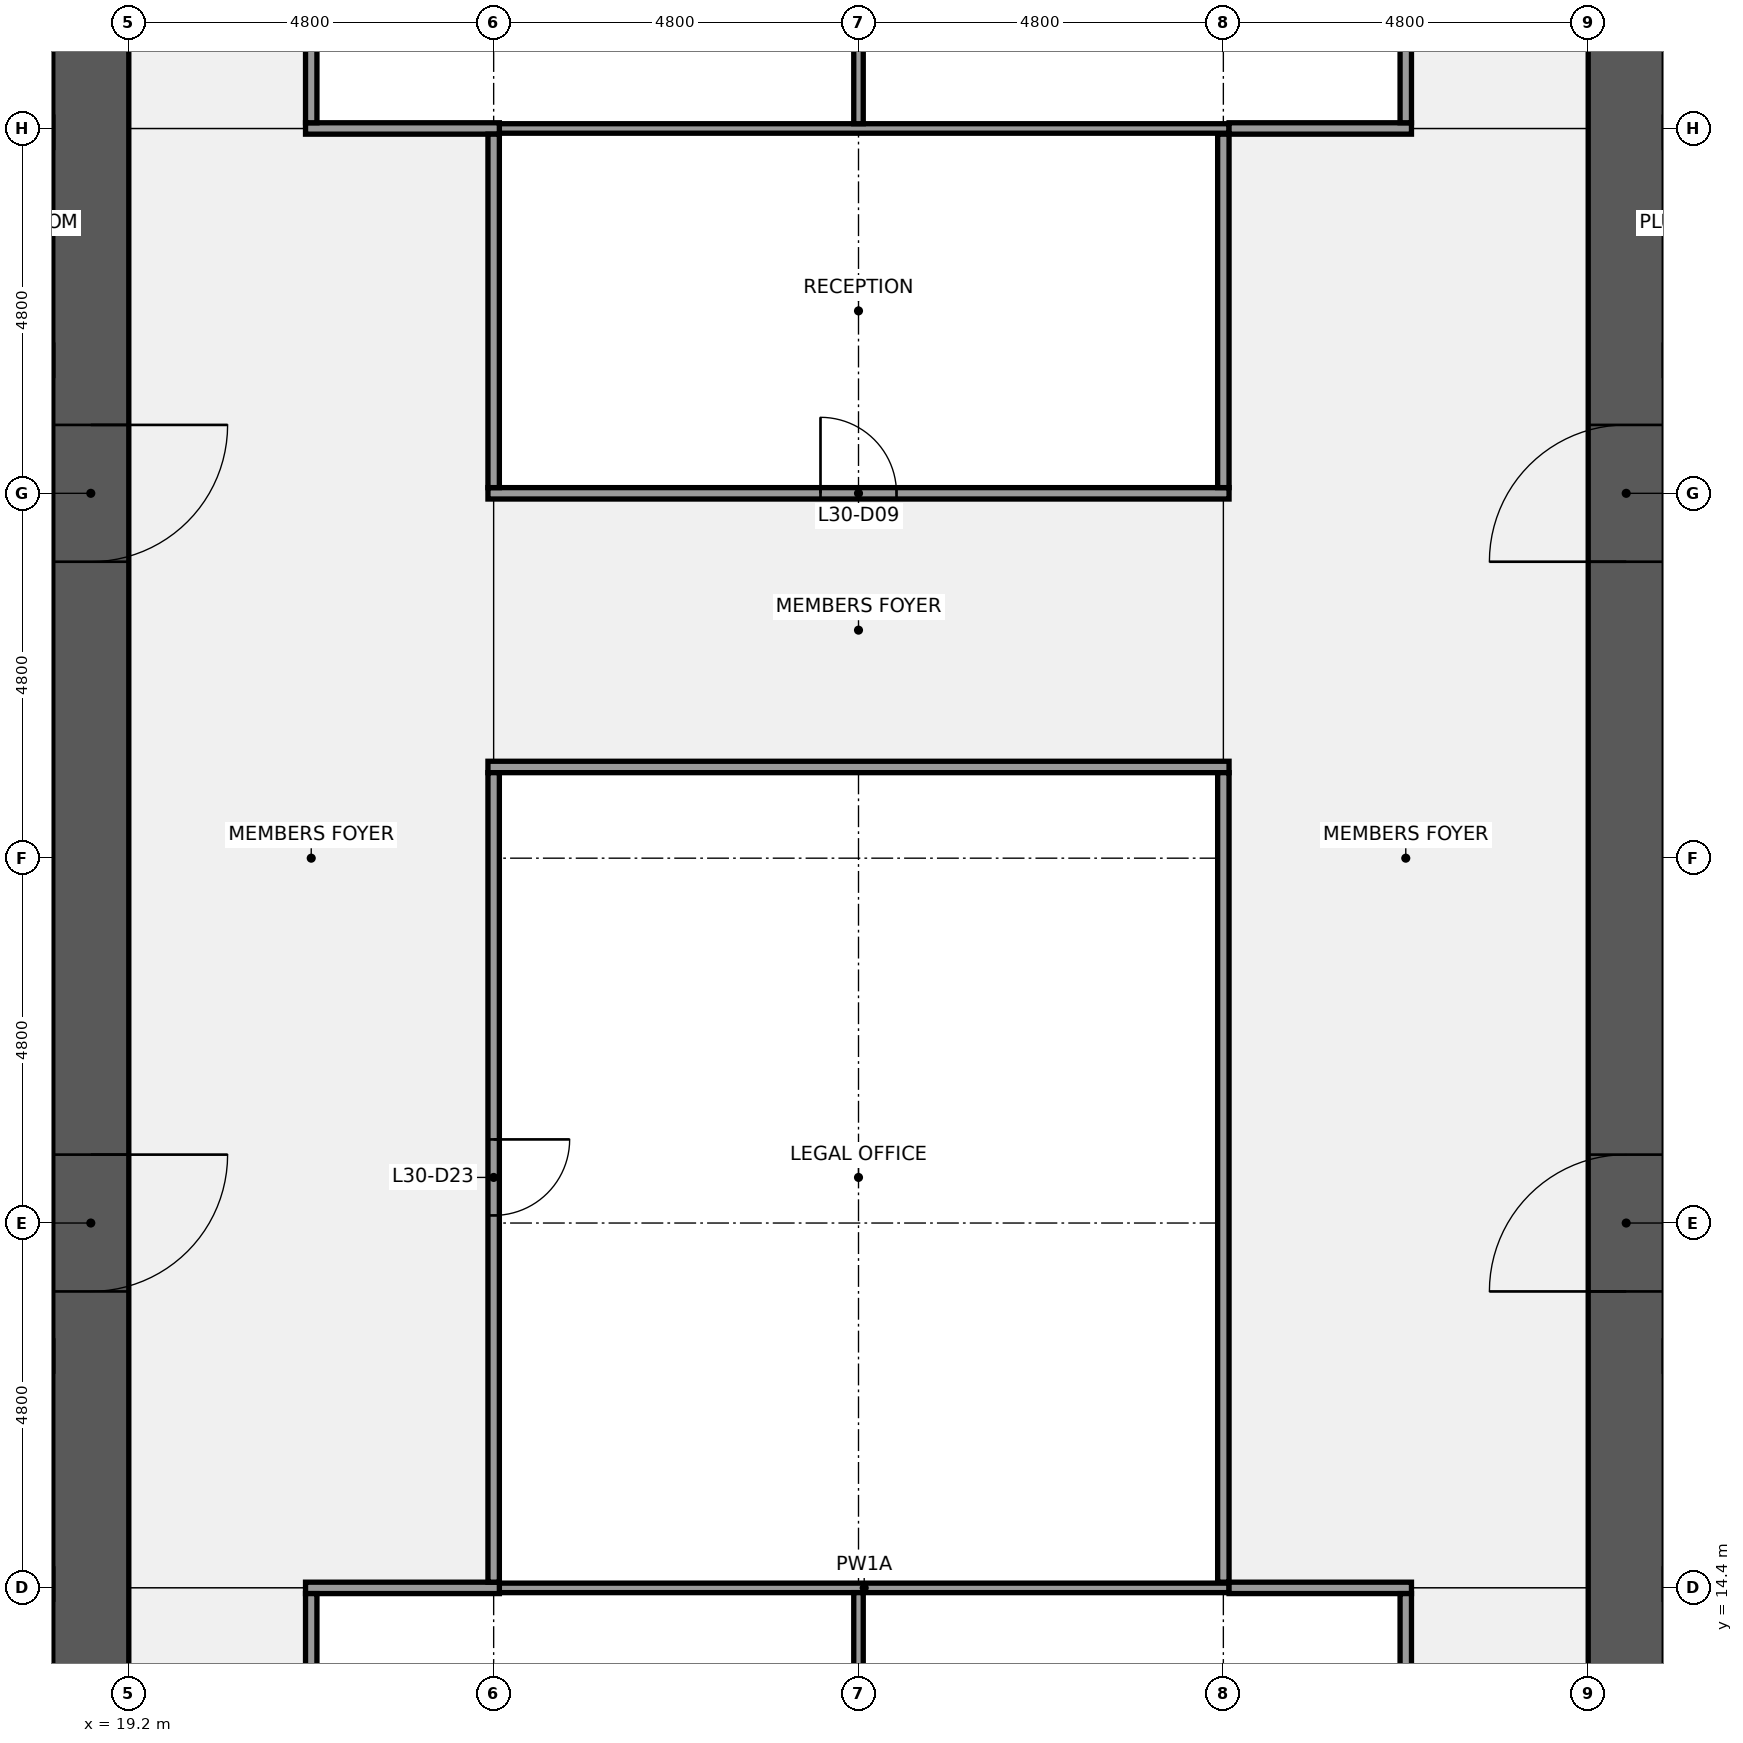
"""IFC4 building model, lengths in metres.
Left out: names, types, materials, properties, quantities, classifications, styles, units other than length and angle.
Written with IfcOpenShell. Run it as: python <this file> out.ifc"""

import sys

from ifc_helpers import new_model, si_unit, direction, frame, frame_2d, origin, place, context, subcontext, project, spatial, rectangle, extrude, element, fill, save


model = new_model("IFC4")
c1 = context("Model", 3, precision=1e-05, world=origin(), true_north=direction((0.0, 1.0)))
c2 = subcontext(c1, "Body", "Model", "MODEL_VIEW")
j1 = project(units=[si_unit("LENGTHUNIT", "METRE"), si_unit("PLANEANGLEUNIT", "RADIAN")], contexts=[c1])
p1 = place(None, origin())
s1 = spatial("IfcSite", under=j1, at=p1, CompositionType="ELEMENT")
p2 = place(p1, origin())
s2 = spatial("IfcBuilding", under=s1, at=p2, CompositionType="ELEMENT")
p3 = place(p2, frame((0.0, 0.0, 140.1)))
s3 = spatial("IfcBuildingStorey", under=s2, at=p3, CompositionType="ELEMENT", Elevation=140.1)
p4 = place(p3, frame((18.7, 38.4, 0.0), z_axis=(0.0, 0.0, 1.0), x_axis=(0.0, -1.0, 0.0)))
e1 = element("IfcWall", 1, at=p4, inside=s3, PredefinedType="SHEAR", context=c2, shape_type="SweptSolid", body=[
    extrude(rectangle(XDim=28.8, YDim=1.0, at=frame_2d((14.4, 0.0))), origin(), (0.0, 0.0, 1.0), 3.84),
])
p5 = place(p4, frame((18.3, 0.0, 0.0)))
e2 = element("IfcOpeningElement", 2, at=p5, cuts=e1, PredefinedType="OPENING", context=c2, shape_type="SweptSolid", body=[
    extrude(rectangle(XDim=1.8, YDim=2.1, at=frame_2d((0.9, 1.05))), frame((0.0, 0.51, 0.0), z_axis=(0.0, -1.0, 0.0), x_axis=(1.0, 0.0, 0.0)), (0.0, 0.0, 1.0), 1.02),
])
p6 = place(p4, frame((8.7, 0.0, 0.0)))
e3 = element("IfcOpeningElement", 3, at=p6, cuts=e1, PredefinedType="OPENING", context=c2, shape_type="SweptSolid", body=[
    extrude(rectangle(XDim=1.8, YDim=2.1, at=frame_2d((0.9, 1.05))), frame((0.0, 0.51, 0.0), z_axis=(0.0, -1.0, 0.0), x_axis=(1.0, 0.0, 0.0)), (0.0, 0.0, 1.0), 1.02),
])
p7 = place(p3, frame((1.0, 14.45, 0.0), z_axis=(0.0, 0.0, 1.0), x_axis=(1.0, 0.0, 0.0)))
e4 = element("IfcWall", 4, at=p7, inside=s3, PredefinedType="SHEAR", context=c2, shape_type="SweptSolid", body=[
    extrude(rectangle(XDim=17.2, YDim=0.4, at=frame_2d((8.6, 0.0))), origin(), (0.0, 0.0, 1.0), 3.84),
])
p8 = place(p3, frame((1.0, 17.45, 0.0), z_axis=(0.0, 0.0, 1.0), x_axis=(1.0, 0.0, 0.0)))
e5 = element("IfcWall", 5, at=p8, inside=s3, PredefinedType="SHEAR", context=c2, shape_type="SweptSolid", body=[
    extrude(rectangle(XDim=17.2, YDim=0.4, at=frame_2d((8.6, 0.0))), origin(), (0.0, 0.0, 1.0), 3.84),
])
p9 = place(p8, frame((0.762, 0.0, 0.0)))
e6 = element("IfcOpeningElement", 6, at=p9, cuts=e5, PredefinedType="OPENING", context=c2, shape_type="SweptSolid", body=[
    extrude(rectangle(XDim=1.0, YDim=2.1, at=frame_2d((0.5, 1.05))), frame((0.0, 0.21, 0.0), z_axis=(0.0, -1.0, 0.0), x_axis=(1.0, 0.0, 0.0)), (0.0, 0.0, 1.0), 0.42),
])
p10 = place(p8, frame((4.2, 0.0, 0.0)))
e7 = element("IfcOpeningElement", 7, at=p10, cuts=e5, PredefinedType="OPENING", context=c2, shape_type="SweptSolid", body=[
    extrude(rectangle(XDim=1.0, YDim=2.1, at=frame_2d((0.5, 1.05))), frame((0.0, 0.21, 0.0), z_axis=(0.0, -1.0, 0.0), x_axis=(1.0, 0.0, 0.0)), (0.0, 0.0, 1.0), 0.42),
])
p11 = place(p8, frame((8.4, 0.0, 0.0)))
e8 = element("IfcOpeningElement", 8, at=p11, cuts=e5, PredefinedType="OPENING", context=c2, shape_type="SweptSolid", body=[
    extrude(rectangle(XDim=1.0, YDim=2.1, at=frame_2d((0.5, 1.05))), frame((0.0, 0.21, 0.0), z_axis=(0.0, -1.0, 0.0), x_axis=(1.0, 0.0, 0.0)), (0.0, 0.0, 1.0), 0.42),
])
p12 = place(p8, frame((13.637, 0.0, 0.0)))
e9 = element("IfcOpeningElement", 9, at=p12, cuts=e5, PredefinedType="OPENING", context=c2, shape_type="SweptSolid", body=[
    extrude(rectangle(XDim=1.0, YDim=2.1, at=frame_2d((0.5, 1.05))), frame((0.0, 0.21, 0.0), z_axis=(0.0, -1.0, 0.0), x_axis=(1.0, 0.0, 0.0)), (0.0, 0.0, 1.0), 0.42),
])
p13 = place(p3, frame((1.0, 30.55, 0.0), z_axis=(0.0, 0.0, 1.0), x_axis=(1.0, 0.0, 0.0)))
e10 = element("IfcWall", 10, at=p13, inside=s3, PredefinedType="SHEAR", context=c2, shape_type="SweptSolid", body=[
    extrude(rectangle(XDim=17.2, YDim=0.4, at=frame_2d((8.6, 0.0))), origin(), (0.0, 0.0, 1.0), 3.84),
])
p14 = place(p13, frame((1.962, 0.0, 0.0)))
e11 = element("IfcOpeningElement", 11, at=p14, cuts=e10, PredefinedType="OPENING", context=c2, shape_type="SweptSolid", body=[
    extrude(rectangle(XDim=1.0, YDim=2.1, at=frame_2d((0.5, 1.05))), frame((0.0, 0.21, 0.0), z_axis=(0.0, -1.0, 0.0), x_axis=(1.0, 0.0, 0.0)), (0.0, 0.0, 1.0), 0.42),
])
p15 = place(p13, frame((6.6, 0.0, 0.0)))
e12 = element("IfcOpeningElement", 12, at=p15, cuts=e10, PredefinedType="OPENING", context=c2, shape_type="SweptSolid", body=[
    extrude(rectangle(XDim=1.0, YDim=2.1, at=frame_2d((0.5, 1.05))), frame((0.0, 0.21, 0.0), z_axis=(0.0, -1.0, 0.0), x_axis=(1.0, 0.0, 0.0)), (0.0, 0.0, 1.0), 0.42),
])
p16 = place(p13, frame((11.1, 0.0, 0.0)))
e13 = element("IfcOpeningElement", 13, at=p16, cuts=e10, PredefinedType="OPENING", context=c2, shape_type="SweptSolid", body=[
    extrude(rectangle(XDim=1.0, YDim=2.1, at=frame_2d((0.5, 1.05))), frame((0.0, 0.21, 0.0), z_axis=(0.0, -1.0, 0.0), x_axis=(1.0, 0.0, 0.0)), (0.0, 0.0, 1.0), 0.42),
])
p17 = place(p13, frame((15.137, 0.0, 0.0)))
e14 = element("IfcOpeningElement", 14, at=p17, cuts=e10, PredefinedType="OPENING", context=c2, shape_type="SweptSolid", body=[
    extrude(rectangle(XDim=1.0, YDim=2.1, at=frame_2d((0.5, 1.05))), frame((0.0, 0.21, 0.0), z_axis=(0.0, -1.0, 0.0), x_axis=(1.0, 0.0, 0.0)), (0.0, 0.0, 1.0), 0.42),
])
p18 = place(p3, frame((1.0, 33.55, 0.0), z_axis=(0.0, 0.0, 1.0), x_axis=(1.0, 0.0, 0.0)))
e15 = element("IfcWall", 15, at=p18, inside=s3, PredefinedType="SHEAR", context=c2, shape_type="SweptSolid", body=[
    extrude(rectangle(XDim=17.2, YDim=0.4, at=frame_2d((8.6, 0.0))), origin(), (0.0, 0.0, 1.0), 3.84),
])
p19 = place(p3, frame((38.9, 9.6, 0.0), z_axis=(0.0, 0.0, 1.0), x_axis=(0.0, 1.0, 0.0)))
e16 = element("IfcWall", 16, at=p19, inside=s3, PredefinedType="SHEAR", context=c2, shape_type="SweptSolid", body=[
    extrude(rectangle(XDim=28.8, YDim=1.0, at=frame_2d((14.4, 0.0))), origin(), (0.0, 0.0, 1.0), 3.84),
])
p20 = place(p19, frame((8.7, 0.0, 0.0)))
e17 = element("IfcOpeningElement", 17, at=p20, cuts=e16, PredefinedType="OPENING", context=c2, shape_type="SweptSolid", body=[
    extrude(rectangle(XDim=1.8, YDim=2.1, at=frame_2d((0.9, 1.05))), frame((0.0, 0.51, 0.0), z_axis=(0.0, -1.0, 0.0), x_axis=(1.0, 0.0, 0.0)), (0.0, 0.0, 1.0), 1.02),
])
p21 = place(p19, frame((18.3, 0.0, 0.0)))
e18 = element("IfcOpeningElement", 18, at=p21, cuts=e16, PredefinedType="OPENING", context=c2, shape_type="SweptSolid", body=[
    extrude(rectangle(XDim=1.8, YDim=2.1, at=frame_2d((0.9, 1.05))), frame((0.0, 0.51, 0.0), z_axis=(0.0, -1.0, 0.0), x_axis=(1.0, 0.0, 0.0)), (0.0, 0.0, 1.0), 1.02),
])
p22 = place(p3, frame((24.075, 14.4, 0.0), z_axis=(0.0, 0.0, 1.0), x_axis=(1.0, 0.0, 0.0)))
e19 = element("IfcWall", 19, at=p22, inside=s3, PredefinedType="PARTITIONING", context=c2, shape_type="SweptSolid", body=[
    extrude(rectangle(XDim=9.6, YDim=0.125, at=frame_2d((4.8, 0.0))), origin(), (0.0, 0.0, 1.0), 2.936),
])
p23 = place(p3, frame((21.525, 14.4, 0.0), z_axis=(0.0, 0.0, 1.0), x_axis=(1.0, 0.0, 0.0)))
e20 = element("IfcWall", 20, at=p23, inside=s3, PredefinedType="PARTITIONING", context=c2, shape_type="SweptSolid", body=[
    extrude(rectangle(XDim=2.55, YDim=0.15, at=frame_2d((1.275, 0.0))), origin(), (0.0, 0.0, 1.0), 2.936),
])
p24 = place(p3, frame((33.675, 14.4, 0.0), z_axis=(0.0, 0.0, 1.0), x_axis=(1.0, 0.0, 0.0)))
e21 = element("IfcWall", 21, at=p24, inside=s3, PredefinedType="PARTITIONING", context=c2, shape_type="SweptSolid", body=[
    extrude(rectangle(XDim=2.4, YDim=0.15, at=frame_2d((1.2, 0.0))), origin(), (0.0, 0.0, 1.0), 2.936),
])
p25 = place(p3, frame((23.925, 25.2, 0.0), z_axis=(0.0, 0.0, 1.0), x_axis=(1.0, 0.0, 0.0)))
e22 = element("IfcWall", 22, at=p25, inside=s3, PredefinedType="PARTITIONING", context=c2, shape_type="SweptSolid", body=[
    extrude(rectangle(XDim=9.75, YDim=0.15, at=frame_2d((4.875, 0.0))), origin(), (0.0, 0.0, 1.0), 2.936),
])
p26 = place(p3, frame((23.925, 28.8, 0.0), z_axis=(0.0, 0.0, 1.0), x_axis=(1.0, 0.0, 0.0)))
e23 = element("IfcWall", 23, at=p26, inside=s3, PredefinedType="PARTITIONING", context=c2, shape_type="SweptSolid", body=[
    extrude(rectangle(XDim=9.75, YDim=0.15, at=frame_2d((4.875, 0.0))), origin(), (0.0, 0.0, 1.0), 2.936),
])
p27 = place(p26, frame((4.375, 0.0, 0.0)))
e24 = element("IfcOpeningElement", 24, at=p27, cuts=e23, PredefinedType="OPENING", context=c2, shape_type="SweptSolid", body=[
    extrude(rectangle(XDim=1.0, YDim=2.1, at=frame_2d((0.5, 1.05))), frame((0.0, 0.085, 0.0), z_axis=(0.0, -1.0, 0.0), x_axis=(1.0, 0.0, 0.0)), (0.0, 0.0, 1.0), 0.17),
])
p28 = place(p3, frame((24.075, 33.6, 0.0), z_axis=(0.0, 0.0, 1.0), x_axis=(1.0, 0.0, 0.0)))
e25 = element("IfcWall", 25, at=p28, inside=s3, PredefinedType="PARTITIONING", context=c2, shape_type="SweptSolid", body=[
    extrude(rectangle(XDim=9.6, YDim=0.125, at=frame_2d((4.8, 0.0))), origin(), (0.0, 0.0, 1.0), 2.936),
])
p29 = place(p3, frame((21.525, 33.6, 0.0), z_axis=(0.0, 0.0, 1.0), x_axis=(1.0, 0.0, 0.0)))
e26 = element("IfcWall", 26, at=p29, inside=s3, PredefinedType="PARTITIONING", context=c2, shape_type="SweptSolid", body=[
    extrude(rectangle(XDim=2.55, YDim=0.15, at=frame_2d((1.275, 0.0))), origin(), (0.0, 0.0, 1.0), 2.936),
])
p30 = place(p3, frame((33.675, 33.6, 0.0), z_axis=(0.0, 0.0, 1.0), x_axis=(1.0, 0.0, 0.0)))
e27 = element("IfcWall", 27, at=p30, inside=s3, PredefinedType="PARTITIONING", context=c2, shape_type="SweptSolid", body=[
    extrude(rectangle(XDim=2.4, YDim=0.15, at=frame_2d((1.2, 0.0))), origin(), (0.0, 0.0, 1.0), 2.936),
])
for number, where, z_axis, x_axis in (
    (28, (21.6, 9.675, 0.0), (0.0, 0.0, 1.0), (0.0, 1.0, 0.0)),
    (29, (21.6, 33.675, 0.0), (0.0, 0.0, 1.0), (0.0, 1.0, 0.0)),
):
    element("IfcWall", number, at=place(p3, frame(where, z_axis=z_axis, x_axis=x_axis)), inside=s3, PredefinedType="PARTITIONING", context=c2, shape_type="SweptSolid", body=[
        extrude(rectangle(XDim=4.65, YDim=0.15, at=frame_2d((2.325, 0.0))), origin(), (0.0, 0.0, 1.0), 2.936),
    ])
p31 = place(p3, frame((24.0, 14.475, 0.0), z_axis=(0.0, 0.0, 1.0), x_axis=(0.0, 1.0, 0.0)))
e30 = element("IfcWall", 30, at=p31, inside=s3, PredefinedType="PARTITIONING", context=c2, shape_type="SweptSolid", body=[
    extrude(rectangle(XDim=10.65, YDim=0.15, at=frame_2d((5.325, 0.0))), origin(), (0.0, 0.0, 1.0), 2.936),
])
p32 = place(p31, frame((4.825, 0.0, 0.0)))
e31 = element("IfcOpeningElement", 31, at=p32, cuts=e30, PredefinedType="OPENING", context=c2, shape_type="SweptSolid", body=[
    extrude(rectangle(XDim=1.0, YDim=2.1, at=frame_2d((0.5, 1.05))), frame((0.0, 0.085, 0.0), z_axis=(0.0, -1.0, 0.0), x_axis=(1.0, 0.0, 0.0)), (0.0, 0.0, 1.0), 0.17),
])
p33 = place(p3, frame((24.0, 28.875, 0.0), z_axis=(0.0, 0.0, 1.0), x_axis=(0.0, 1.0, 0.0)))
e32 = element("IfcWall", 32, at=p33, inside=s3, PredefinedType="PARTITIONING", context=c2, shape_type="SweptSolid", body=[
    extrude(rectangle(XDim=4.65, YDim=0.15, at=frame_2d((2.325, 0.0))), origin(), (0.0, 0.0, 1.0), 2.936),
])
for number, where, z_axis, x_axis in (
    (33, (28.8, 9.675, 0.0), (0.0, 0.0, 1.0), (0.0, 1.0, 0.0)),
    (34, (28.8, 33.663, 0.0), (0.0, 0.0, 1.0), (0.0, 1.0, 0.0)),
):
    element("IfcWall", number, at=place(p3, frame(where, z_axis=z_axis, x_axis=x_axis)), inside=s3, PredefinedType="PARTITIONING", context=c2, shape_type="SweptSolid", body=[
        extrude(rectangle(XDim=4.662, YDim=0.125, at=frame_2d((2.331, 0.0))), origin(), (0.0, 0.0, 1.0), 2.936),
    ])
p34 = place(p3, frame((33.6, 14.475, 0.0), z_axis=(0.0, 0.0, 1.0), x_axis=(0.0, 1.0, 0.0)))
e35 = element("IfcWall", 35, at=p34, inside=s3, PredefinedType="PARTITIONING", context=c2, shape_type="SweptSolid", body=[
    extrude(rectangle(XDim=10.65, YDim=0.15, at=frame_2d((5.325, 0.0))), origin(), (0.0, 0.0, 1.0), 2.936),
])
for number, where, z_axis, x_axis in (
    (36, (33.6, 28.875, 0.0), (0.0, 0.0, 1.0), (0.0, 1.0, 0.0)),
    (37, (36.0, 9.675, 0.0), (0.0, 0.0, 1.0), (0.0, 1.0, 0.0)),
    (38, (36.0, 33.675, 0.0), (0.0, 0.0, 1.0), (0.0, 1.0, 0.0)),
):
    element("IfcWall", number, at=place(p3, frame(where, z_axis=z_axis, x_axis=x_axis)), inside=s3, PredefinedType="PARTITIONING", context=c2, shape_type="SweptSolid", body=[
        extrude(rectangle(XDim=4.65, YDim=0.15, at=frame_2d((2.325, 0.0))), origin(), (0.0, 0.0, 1.0), 2.936),
    ])
p35 = place(p5, origin())
e39 = element("IfcDoor", 39, at=p35, inside=s3, OperationType="DOUBLE_DOOR_SINGLE_SWING", PredefinedType="DOOR", context=c2, shape_type="SweptSolid", body=[
    extrude(rectangle(XDim=1.8, YDim=2.1, at=frame_2d((0.9, 1.05))), frame((0.0, 0.025, 0.0), z_axis=(0.0, -1.0, 0.0), x_axis=(1.0, 0.0, 0.0)), (0.0, 0.0, 1.0), 0.05),
])
fill(e2, e39)
p36 = place(p6, origin())
e40 = element("IfcDoor", 40, at=p36, inside=s3, OperationType="DOUBLE_DOOR_SINGLE_SWING", PredefinedType="DOOR", context=c2, shape_type="SweptSolid", body=[
    extrude(rectangle(XDim=1.8, YDim=2.1, at=frame_2d((0.9, 1.05))), frame((0.0, 0.025, 0.0), z_axis=(0.0, -1.0, 0.0), x_axis=(1.0, 0.0, 0.0)), (0.0, 0.0, 1.0), 0.05),
])
fill(e3, e40)
p37 = place(p20, origin())
e41 = element("IfcDoor", 41, at=p37, inside=s3, OperationType="DOUBLE_DOOR_SINGLE_SWING", PredefinedType="DOOR", context=c2, shape_type="SweptSolid", body=[
    extrude(rectangle(XDim=1.8, YDim=2.1, at=frame_2d((0.9, 1.05))), frame((0.0, 0.025, 0.0), z_axis=(0.0, -1.0, 0.0), x_axis=(1.0, 0.0, 0.0)), (0.0, 0.0, 1.0), 0.05),
])
fill(e17, e41)
p38 = place(p21, origin())
e42 = element("IfcDoor", 42, at=p38, inside=s3, OperationType="DOUBLE_DOOR_SINGLE_SWING", PredefinedType="DOOR", context=c2, shape_type="SweptSolid", body=[
    extrude(rectangle(XDim=1.8, YDim=2.1, at=frame_2d((0.9, 1.05))), frame((0.0, 0.025, 0.0), z_axis=(0.0, -1.0, 0.0), x_axis=(1.0, 0.0, 0.0)), (0.0, 0.0, 1.0), 0.05),
])
fill(e18, e42)
p39 = place(p27, origin())
e43 = element("IfcDoor", 43, at=p39, inside=s3, OperationType="SINGLE_SWING_LEFT", PredefinedType="DOOR", context=c2, shape_type="SweptSolid", body=[
    extrude(rectangle(XDim=1.0, YDim=2.1, at=frame_2d((0.5, 1.05))), frame((0.0, 0.025, 0.0), z_axis=(0.0, -1.0, 0.0), x_axis=(1.0, 0.0, 0.0)), (0.0, 0.0, 1.0), 0.05),
])
fill(e24, e43)
p40 = place(p32, origin())
e44 = element("IfcDoor", 44, at=p40, inside=s3, OperationType="SINGLE_SWING_RIGHT", PredefinedType="DOOR", context=c2, shape_type="SweptSolid", body=[
    extrude(rectangle(XDim=1.0, YDim=2.1, at=frame_2d((0.5, 1.05))), frame((0.0, 0.025, 0.0), z_axis=(0.0, -1.0, 0.0), x_axis=(1.0, 0.0, 0.0)), (0.0, 0.0, 1.0), 0.05),
])
fill(e31, e44)
save(model, sys.argv[1])
